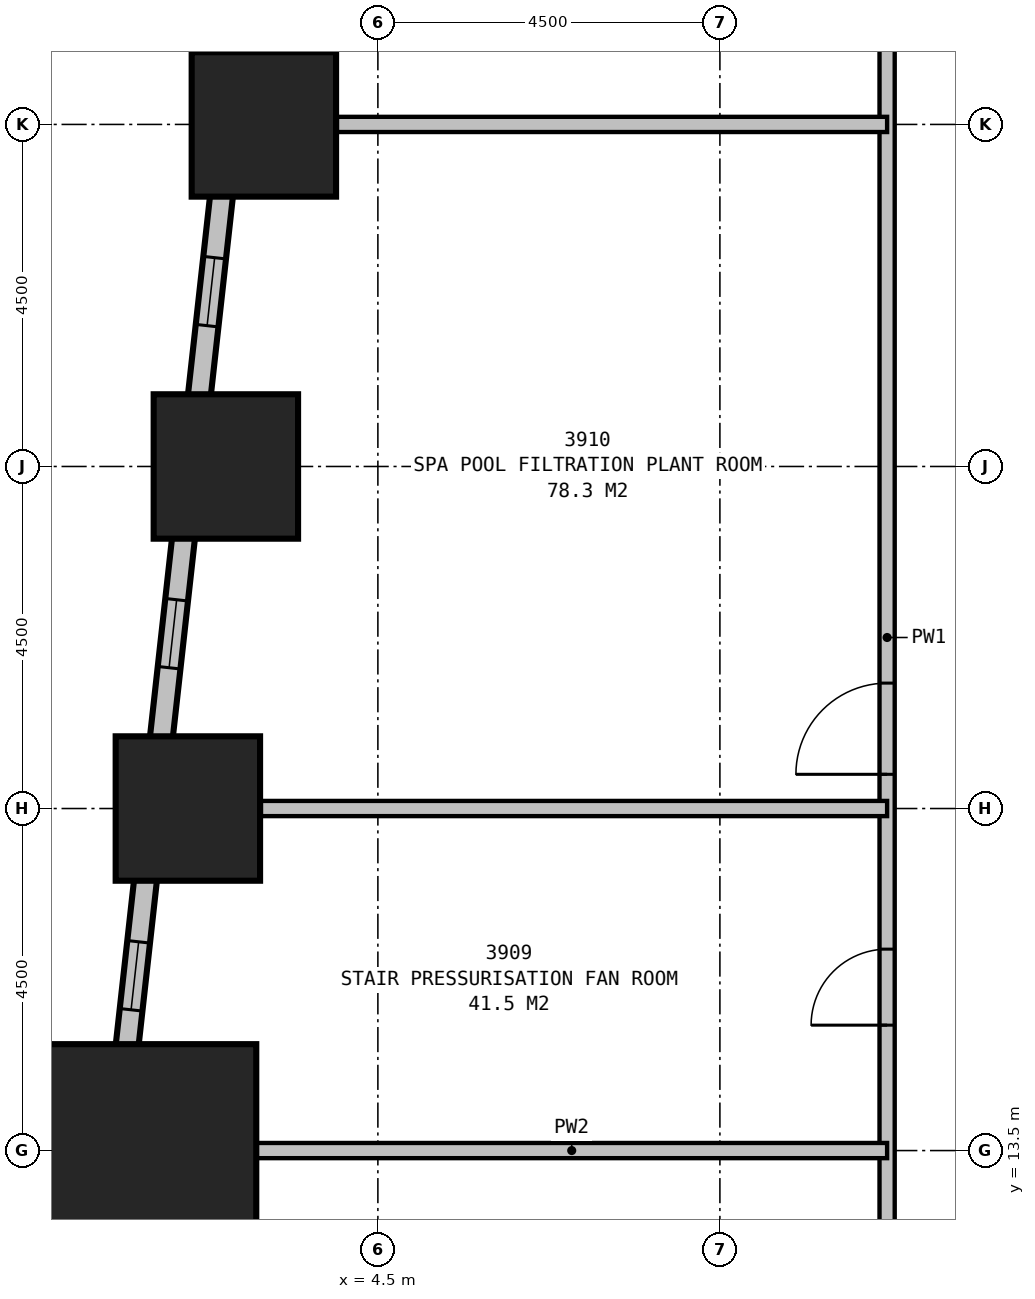
"""IFC4 building model, lengths in metres.
Left out: names, types, materials, properties, quantities, classifications, styles, units other than length and angle.
Written with IfcOpenShell. Run it as: python <this file> out.ifc"""

import sys

from ifc_helpers import new_model, si_unit, direction, frame, frame_2d, origin, origin_2d, place, context, subcontext, project, spatial, rectangle, extrude, element, fill, save


model = new_model("IFC4")
c1 = context("Model", 3, precision=1e-05, world=origin(), true_north=direction((0.0, 1.0)))
c2 = subcontext(c1, "Body", "Model", "MODEL_VIEW")
j1 = project(units=[si_unit("LENGTHUNIT", "METRE"), si_unit("PLANEANGLEUNIT", "RADIAN")], contexts=[c1])
p1 = place(None, origin())
s1 = spatial("IfcSite", under=j1, at=p1, CompositionType="ELEMENT")
p2 = place(p1, origin())
s2 = spatial("IfcBuilding", under=s1, at=p2, CompositionType="ELEMENT")
p3 = place(p2, frame((0.0, 0.0, 151.9)))
s3 = spatial("IfcBuildingStorey", under=s2, at=p3, CompositionType="ELEMENT", Elevation=151.9)
for number, where, z_axis, x_axis in (
    (1, (3.0, 27.0, 0.0), (0.0, 0.0, 1.0), (1.0, 0.0, 0.0)),
    (2, (2.5, 22.5, 0.0), (0.0, 0.0, 1.0), (1.0, 0.0, 0.0)),
    (3, (2.0, 18.0, 0.0), (0.0, 0.0, 1.0), (1.0, 0.0, 0.0)),
):
    element("IfcColumn", number, at=place(p3, frame(where, z_axis=z_axis, x_axis=x_axis)), inside=s3, PredefinedType="COLUMN", context=c2, shape_type="SweptSolid", body=[
        extrude(rectangle(XDim=1.9, YDim=1.9, at=origin_2d()), origin(), (0.0, 0.0, 1.0), 6.0),
    ])
p4 = place(p3, frame((1.5, 13.5, 0.0), z_axis=(0.0, 0.0, 1.0), x_axis=(1.0, 0.0, 0.0)))
e4 = element("IfcColumn", 4, at=p4, inside=s3, PredefinedType="COLUMN", context=c2, shape_type="SweptSolid", body=[
    extrude(rectangle(XDim=2.8, YDim=2.8, at=origin_2d()), origin(), (0.0, 0.0, 1.0), 6.0),
])
p5 = place(p3, frame((3.614, 36.599, 0.0), z_axis=(0.0, 0.0, 1.0), x_axis=(-0.110429082637, -0.993884006164, 0.0)))
e5 = element("IfcWall", 5, at=p5, inside=s3, PredefinedType="STANDARD", context=c2, shape_type="SweptSolid", body=[
    extrude(rectangle(XDim=32.899, YDim=0.3, at=frame_2d((16.45, 0.0))), origin(), (0.0, 0.0, 1.0), 3.35),
])
p6 = place(p5, frame((2.367, 0.0, 0.5)))
e6 = element("IfcOpeningElement", 6, at=p6, cuts=e5, PredefinedType="OPENING", context=c2, shape_type="SweptSolid", body=[
    extrude(rectangle(XDim=0.9, YDim=1.2, at=frame_2d((0.45, 0.6))), frame((0.0, 0.16, 0.0), z_axis=(0.0, -1.0, 0.0), x_axis=(1.0, 0.0, 0.0)), (0.0, 0.0, 1.0), 0.32),
])
p7 = place(p5, frame((6.895, 0.0, 0.5)))
e7 = element("IfcOpeningElement", 7, at=p7, cuts=e5, PredefinedType="OPENING", context=c2, shape_type="SweptSolid", body=[
    extrude(rectangle(XDim=0.9, YDim=1.2, at=frame_2d((0.45, 0.6))), frame((0.0, 0.16, 0.0), z_axis=(0.0, -1.0, 0.0), x_axis=(1.0, 0.0, 0.0)), (0.0, 0.0, 1.0), 0.32),
])
p8 = place(p5, frame((11.422, 0.0, 0.5)))
e8 = element("IfcOpeningElement", 8, at=p8, cuts=e5, PredefinedType="OPENING", context=c2, shape_type="SweptSolid", body=[
    extrude(rectangle(XDim=0.9, YDim=1.2, at=frame_2d((0.45, 0.6))), frame((0.0, 0.16, 0.0), z_axis=(0.0, -1.0, 0.0), x_axis=(1.0, 0.0, 0.0)), (0.0, 0.0, 1.0), 0.32),
])
p9 = place(p5, frame((15.95, 0.0, 0.5)))
e9 = element("IfcOpeningElement", 9, at=p9, cuts=e5, PredefinedType="OPENING", context=c2, shape_type="SweptSolid", body=[
    extrude(rectangle(XDim=0.9, YDim=1.2, at=frame_2d((0.45, 0.6))), frame((0.0, 0.16, 0.0), z_axis=(0.0, -1.0, 0.0), x_axis=(1.0, 0.0, 0.0)), (0.0, 0.0, 1.0), 0.32),
])
p10 = place(p5, frame((20.478, 0.0, 0.5)))
e10 = element("IfcOpeningElement", 10, at=p10, cuts=e5, PredefinedType="OPENING", context=c2, shape_type="SweptSolid", body=[
    extrude(rectangle(XDim=0.9, YDim=1.2, at=frame_2d((0.45, 0.6))), frame((0.0, 0.16, 0.0), z_axis=(0.0, -1.0, 0.0), x_axis=(1.0, 0.0, 0.0)), (0.0, 0.0, 1.0), 0.32),
])
p11 = place(p5, frame((25.005, 0.0, 0.5)))
e11 = element("IfcOpeningElement", 11, at=p11, cuts=e5, PredefinedType="OPENING", context=c2, shape_type="SweptSolid", body=[
    extrude(rectangle(XDim=0.9, YDim=1.2, at=frame_2d((0.45, 0.6))), frame((0.0, 0.16, 0.0), z_axis=(0.0, -1.0, 0.0), x_axis=(1.0, 0.0, 0.0)), (0.0, 0.0, 1.0), 0.32),
])
p12 = place(p5, frame((29.533, 0.0, 0.5)))
e12 = element("IfcOpeningElement", 12, at=p12, cuts=e5, PredefinedType="OPENING", context=c2, shape_type="SweptSolid", body=[
    extrude(rectangle(XDim=0.9, YDim=1.2, at=frame_2d((0.45, 0.6))), frame((0.0, 0.16, 0.0), z_axis=(0.0, -1.0, 0.0), x_axis=(1.0, 0.0, 0.0)), (0.0, 0.0, 1.0), 0.32),
])
p13 = place(p3, frame((11.2, 11.2, 0.0), z_axis=(0.0, 0.0, 1.0), x_axis=(0.0, 1.0, 0.0)))
e13 = element("IfcWall", 13, at=p13, inside=s3, PredefinedType="PARTITIONING", context=c2, shape_type="SweptSolid", body=[
    extrude(rectangle(XDim=18.1, YDim=0.2, at=frame_2d((9.05, 0.0))), origin(), (0.0, 0.0, 1.0), 5.75),
])
p14 = place(p13, frame((3.95, 0.0, 0.0)))
e14 = element("IfcOpeningElement", 14, at=p14, cuts=e13, PredefinedType="OPENING", context=c2, shape_type="SweptSolid", body=[
    extrude(rectangle(XDim=1.0, YDim=2.1, at=frame_2d((0.5, 1.05))), frame((0.0, 0.11, 0.0), z_axis=(0.0, -1.0, 0.0), x_axis=(1.0, 0.0, 0.0)), (0.0, 0.0, 1.0), 0.22),
])
p15 = place(p13, frame((7.25, 0.0, 0.0)))
e15 = element("IfcOpeningElement", 15, at=p15, cuts=e13, PredefinedType="OPENING", context=c2, shape_type="SweptSolid", body=[
    extrude(rectangle(XDim=1.2, YDim=2.1, at=frame_2d((0.6, 1.05))), frame((0.0, 0.11, 0.0), z_axis=(0.0, -1.0, 0.0), x_axis=(1.0, 0.0, 0.0)), (0.0, 0.0, 1.0), 0.22),
])
p16 = place(p3, frame((11.2, 13.5, 0.0), z_axis=(0.0, 0.0, 1.0), x_axis=(-1.0, 0.0, 0.0)))
e16 = element("IfcWall", 16, at=p16, inside=s3, PredefinedType="PARTITIONING", context=c2, shape_type="SweptSolid", body=[
    extrude(rectangle(XDim=8.299, YDim=0.2, at=frame_2d((4.149, 0.0))), origin(), (0.0, 0.0, 1.0), 1.85),
])
p17 = place(p3, frame((11.2, 18.0, 0.0), z_axis=(0.0, 0.0, 1.0), x_axis=(-1.0, 0.0, 0.0)))
e17 = element("IfcWall", 17, at=p17, inside=s3, PredefinedType="PARTITIONING", context=c2, shape_type="SweptSolid", body=[
    extrude(rectangle(XDim=8.239, YDim=0.2, at=frame_2d((4.12, 0.0))), origin(), (0.0, 0.0, 1.0), 4.75),
])
p18 = place(p3, frame((11.2, 27.0, 0.0), z_axis=(0.0, 0.0, 1.0), x_axis=(-1.0, 0.0, 0.0)))
e18 = element("IfcWall", 18, at=p18, inside=s3, PredefinedType="PARTITIONING", context=c2, shape_type="SweptSolid", body=[
    extrude(rectangle(XDim=7.239, YDim=0.2, at=frame_2d((3.62, 0.0))), origin(), (0.0, 0.0, 1.0), 4.45),
])
p19 = place(p8, origin())
e19 = element("IfcWindow", 19, at=p19, inside=s3, PartitioningType="SINGLE_PANEL", PredefinedType="USERDEFINED", context=c2, shape_type="SweptSolid", body=[
    extrude(rectangle(XDim=0.9, YDim=1.2, at=frame_2d((0.45, 0.6))), frame((0.0, 0.03, 0.0), z_axis=(0.0, -1.0, 0.0), x_axis=(1.0, 0.0, 0.0)), (0.0, 0.0, 1.0), 0.06),
])
fill(e8, e19)
p20 = place(p9, origin())
e20 = element("IfcWindow", 20, at=p20, inside=s3, PartitioningType="SINGLE_PANEL", PredefinedType="USERDEFINED", context=c2, shape_type="SweptSolid", body=[
    extrude(rectangle(XDim=0.9, YDim=1.2, at=frame_2d((0.45, 0.6))), frame((0.0, 0.03, 0.0), z_axis=(0.0, -1.0, 0.0), x_axis=(1.0, 0.0, 0.0)), (0.0, 0.0, 1.0), 0.06),
])
fill(e9, e20)
p21 = place(p10, origin())
e21 = element("IfcWindow", 21, at=p21, inside=s3, PartitioningType="SINGLE_PANEL", PredefinedType="USERDEFINED", context=c2, shape_type="SweptSolid", body=[
    extrude(rectangle(XDim=0.9, YDim=1.2, at=frame_2d((0.45, 0.6))), frame((0.0, 0.03, 0.0), z_axis=(0.0, -1.0, 0.0), x_axis=(1.0, 0.0, 0.0)), (0.0, 0.0, 1.0), 0.06),
])
fill(e10, e21)
p22 = place(p14, origin())
e22 = element("IfcDoor", 22, at=p22, inside=s3, OperationType="SINGLE_SWING_LEFT", PredefinedType="DOOR", context=c2, shape_type="SweptSolid", body=[
    extrude(rectangle(XDim=1.0, YDim=2.1, at=frame_2d((0.5, 1.05))), frame((0.0, 0.025, 0.0), z_axis=(0.0, -1.0, 0.0), x_axis=(1.0, 0.0, 0.0)), (0.0, 0.0, 1.0), 0.05),
])
fill(e14, e22)
p23 = place(p15, origin())
e23 = element("IfcDoor", 23, at=p23, inside=s3, OperationType="SINGLE_SWING_LEFT", PredefinedType="DOOR", context=c2, shape_type="SweptSolid", body=[
    extrude(rectangle(XDim=1.2, YDim=2.1, at=frame_2d((0.6, 1.05))), frame((0.0, 0.025, 0.0), z_axis=(0.0, -1.0, 0.0), x_axis=(1.0, 0.0, 0.0)), (0.0, 0.0, 1.0), 0.05),
])
fill(e15, e23)
save(model, sys.argv[1])
